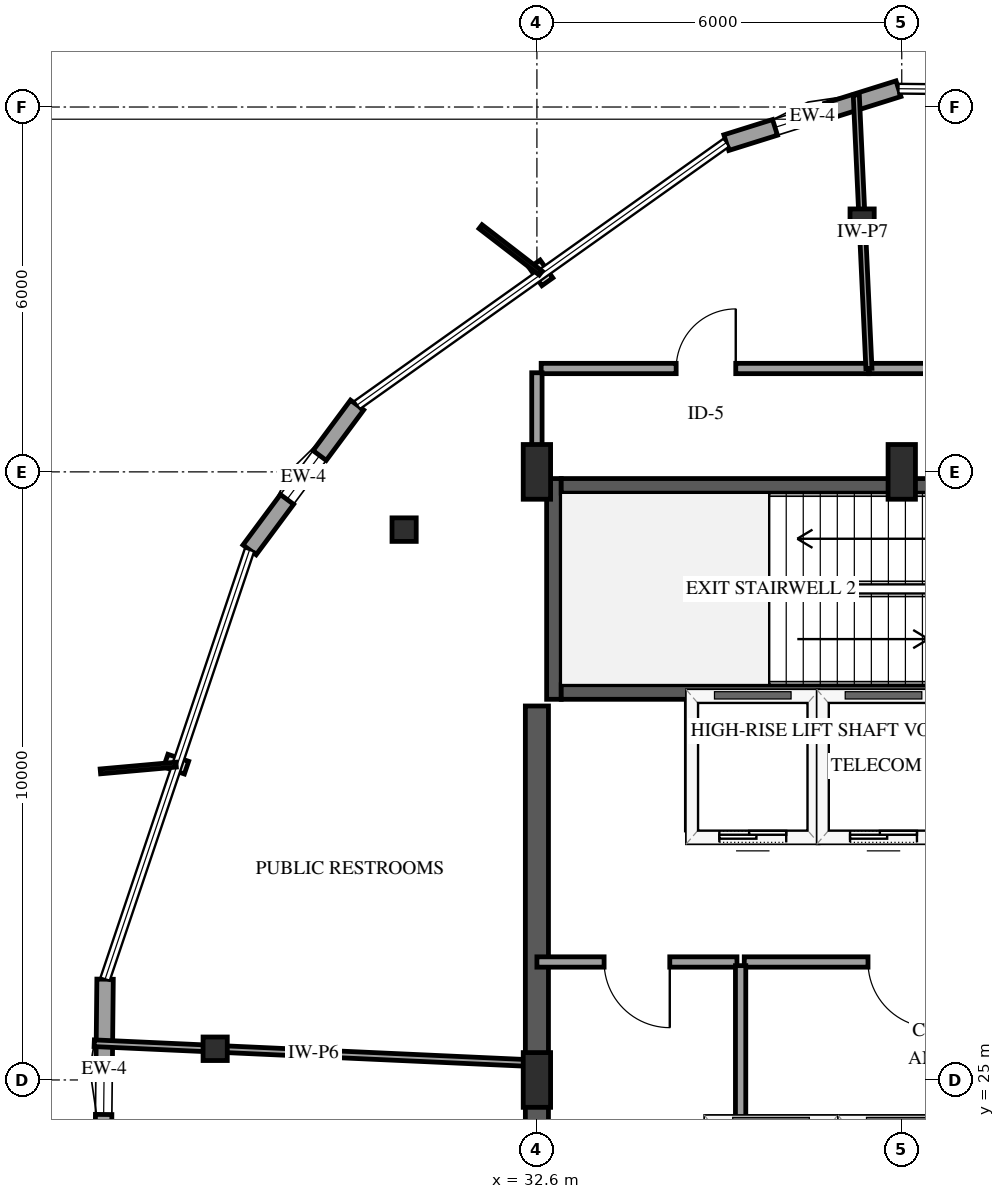
"""IFC4 building model, lengths in metres.
Left out: names, types, materials, properties, quantities, classifications, styles, units other than length and angle.
Written with IfcOpenShell. Run it as: python <this file> out.ifc"""

import sys

from ifc_helpers import new_model, si_unit, direction, frame, frame_2d, origin, origin_2d, place, context, subcontext, project, spatial, rectangle, i_section, extrude, element, fill, save


model = new_model("IFC4")
c1 = context("Model", 3, precision=1e-05, world=origin(), true_north=direction((0.0, 1.0)))
c2 = subcontext(c1, "Body", "Model", "MODEL_VIEW")
j1 = project(units=[si_unit("LENGTHUNIT", "METRE"), si_unit("PLANEANGLEUNIT", "RADIAN")], contexts=[c1])
p1 = place(None, origin())
s1 = spatial("IfcSite", under=j1, at=p1, CompositionType="ELEMENT")
p2 = place(p1, origin())
s2 = spatial("IfcBuilding", under=s1, at=p2, CompositionType="ELEMENT")
p3 = place(p2, frame((0.0, 0.0, 297.25)))
s3 = spatial("IfcBuildingStorey", under=s2, at=p3, CompositionType="ELEMENT", Elevation=297.25)
p4 = place(p3, frame((32.88, 31.26, 0.0), z_axis=(0.0, 0.0, 1.0), x_axis=(0.0, 1.0, 0.0)))
e1 = element("IfcWall", 1, at=p4, inside=s3, PredefinedType="SHEAR", context=c2, shape_type="SweptSolid", body=[
    extrude(rectangle(XDim=3.63, YDim=0.24, at=frame_2d((1.815, 0.0))), origin(), (0.0, 0.0, 1.0), 4.2),
])
for number, where, z_axis, x_axis in (
    (2, (33.0, 31.38, 0.0), (0.0, 0.0, 1.0), (1.0, 0.0, 0.0)),
    (3, (33.0, 34.77, 0.0), (0.0, 0.0, 1.0), (1.0, 0.0, 0.0)),
):
    element("IfcWall", number, at=place(p3, frame(where, z_axis=z_axis, x_axis=x_axis)), inside=s3, PredefinedType="SHEAR", context=c2, shape_type="SweptSolid", body=[
        extrude(rectangle(XDim=8.0, YDim=0.24, at=frame_2d((4.0, 0.0))), origin(), (0.0, 0.0, 1.0), 4.2),
    ])
p5 = place(p3, frame((32.6, 18.85, 0.0), z_axis=(0.0, 0.0, 1.0), x_axis=(0.0, 1.0, 0.0)))
e4 = element("IfcWall", 4, at=p5, inside=s3, PredefinedType="SHEAR", context=c2, shape_type="SweptSolid", body=[
    extrude(rectangle(XDim=12.3, YDim=0.38, at=frame_2d((6.15, 0.0))), origin(), (0.0, 0.0, 1.0), 4.2),
])
for number, where, z_axis, x_axis in (
    (5, (32.6, 25.0, 0.0), (0.0, 0.0, 1.0), (1.0, 0.0, 0.0)),
    (6, (32.6, 35.0, 0.0), (0.0, 0.0, 1.0), (1.0, 0.0, 0.0)),
    (7, (38.6, 35.0, 0.0), (0.0, 0.0, 1.0), (1.0, 0.0, 0.0)),
):
    element("IfcColumn", number, at=place(p3, frame(where, z_axis=z_axis, x_axis=x_axis)), inside=s3, PredefinedType="PILASTER", context=c2, shape_type="SweptSolid", body=[
        extrude(rectangle(XDim=0.45, YDim=0.9, at=origin_2d()), origin(), (0.0, 0.0, 1.0), 4.2),
    ])
for number, where, z_axis, x_axis in (
    (8, (37.948, 39.131, 0.0), (0.0, 0.0, 1.0), (1.0, 0.0, 0.0)),
    (9, (30.416, 34.05, 0.0), (0.0, 0.0, 1.0), (1.0, 0.0, 0.0)),
    (10, (27.309, 25.513, 0.0), (0.0, 0.0, 1.0), (1.0, 0.0, 0.0)),
):
    element("IfcColumn", number, at=place(p3, frame(where, z_axis=z_axis, x_axis=x_axis)), inside=s3, PredefinedType="COLUMN", context=c2, shape_type="SweptSolid", body=[
        extrude(i_section(OverallWidth=0.398, OverallDepth=0.387, WebThickness=0.021, FlangeThickness=0.033, FilletRadius=0.038, at=origin_2d()), origin(), (0.0, 0.0, 1.0), 4.2),
    ])
p6 = place(p3, frame((38.546, 41.301, 0.0), z_axis=(0.0, 0.0, 1.0), x_axis=(-0.954232173164, -0.299066814772, 0.0)))
e11 = element("IfcWall", 11, at=p6, inside=s3, PredefinedType="SOLIDWALL", context=c2, shape_type="SweptSolid", body=[
    extrude(rectangle(XDim=2.967, YDim=0.27, at=frame_2d((1.483, 0.0))), origin(), (0.0, 0.0, 1.0), 3.274),
])
p7 = place(p6, frame((1.228, 0.0, 0.75)))
e12 = element("IfcOpeningElement", 12, at=p7, cuts=e11, PredefinedType="OPENING", context=c2, shape_type="SweptSolid", body=[
    extrude(rectangle(XDim=0.9, YDim=1.5, at=frame_2d((0.45, 0.75))), frame((0.0, 0.145, 0.0), z_axis=(0.0, -1.0, 0.0), x_axis=(1.0, 0.0, 0.0)), (0.0, 0.0, 1.0), 0.29),
])
p8 = place(p3, frame((29.643, 36.099, 0.0), z_axis=(0.0, 0.0, 1.0), x_axis=(-0.596187618303, -0.80284514309, 0.0)))
e13 = element("IfcWall", 13, at=p8, inside=s3, PredefinedType="SOLIDWALL", context=c2, shape_type="SweptSolid", body=[
    extrude(rectangle(XDim=2.967, YDim=0.27, at=frame_2d((1.483, 0.0))), origin(), (0.0, 0.0, 1.0), 3.274),
])
p9 = place(p8, frame((1.033, 0.0, 0.75)))
e14 = element("IfcOpeningElement", 14, at=p9, cuts=e13, PredefinedType="OPENING", context=c2, shape_type="SweptSolid", body=[
    extrude(rectangle(XDim=0.9, YDim=1.5, at=frame_2d((0.45, 0.75))), frame((0.0, 0.145, 0.0), z_axis=(0.0, -1.0, 0.0), x_axis=(1.0, 0.0, 0.0)), (0.0, 0.0, 1.0), 0.29),
])
p10 = place(p3, frame((25.498, 26.657, 0.0), z_axis=(0.0, 0.0, 1.0), x_axis=(-0.010452103923, -0.99994537527, 0.0)))
e15 = element("IfcWall", 15, at=p10, inside=s3, PredefinedType="SOLIDWALL", context=c2, shape_type="SweptSolid", body=[
    extrude(rectangle(XDim=2.967, YDim=0.27, at=frame_2d((1.483, 0.0))), origin(), (0.0, 0.0, 1.0), 3.274),
])
p11 = place(p10, frame((1.325, 0.0, 0.75)))
e16 = element("IfcOpeningElement", 16, at=p11, cuts=e15, PredefinedType="OPENING", context=c2, shape_type="SweptSolid", body=[
    extrude(rectangle(XDim=0.9, YDim=1.5, at=frame_2d((0.45, 0.75))), frame((0.0, 0.145, 0.0), z_axis=(0.0, -1.0, 0.0), x_axis=(1.0, 0.0, 0.0)), (0.0, 0.0, 1.0), 0.29),
])
for number, where, z_axis, x_axis in (
    (17, (35.45, 24.3, 0.0), (0.0, 0.0, 1.0), (1.0, 0.0, 0.0)),
    (18, (37.65, 24.3, 0.0), (0.0, 0.0, 1.0), (1.0, 0.0, 0.0)),
):
    element("IfcWall", number, at=place(p3, frame(where, z_axis=z_axis, x_axis=x_axis)), inside=s3, PredefinedType="SOLIDWALL", context=c2, shape_type="SweptSolid", body=[
        extrude(rectangle(XDim=2.0, YDim=0.185, at=frame_2d((1.0, 0.0))), origin(), (0.0, 0.0, 1.0), 3.895),
    ])
p12 = place(p3, frame((35.15, 29.0, 0.0), z_axis=(0.0, 0.0, 1.0), x_axis=(1.0, 0.0, 0.0)))
e19 = element("IfcWall", 19, at=p12, inside=s3, PredefinedType="SOLIDWALL", context=c2, shape_type="SweptSolid", body=[
    extrude(rectangle(XDim=2.0, YDim=0.185, at=frame_2d((1.0, 0.0))), origin(), (0.0, 0.0, 1.0), 3.895),
])
p13 = place(p12, frame((0.45, 0.0, 0.0)))
e20 = element("IfcOpeningElement", 20, at=p13, cuts=e19, PredefinedType="OPENING", context=c2, shape_type="SweptSolid", body=[
    extrude(rectangle(XDim=1.1, YDim=2.15, at=frame_2d((0.55, 1.075))), frame((0.0, 0.103, 0.0), z_axis=(0.0, -1.0, 0.0), x_axis=(1.0, 0.0, 0.0)), (0.0, 0.0, 1.0), 0.205),
])
for number, where, z_axis, x_axis in (
    (21, (35.15, 29.11, 0.0), (0.0, 0.0, 1.0), (0.0, 1.0, 0.0)),
    (22, (37.15, 29.11, 0.0), (0.0, 0.0, 1.0), (0.0, 1.0, 0.0)),
):
    element("IfcWall", number, at=place(p3, frame(where, z_axis=z_axis, x_axis=x_axis)), inside=s3, PredefinedType="SOLIDWALL", context=c2, shape_type="SweptSolid", body=[
        extrude(rectangle(XDim=2.1, YDim=0.185, at=frame_2d((1.05, 0.0))), origin(), (0.0, 0.0, 1.0), 3.895),
    ])
p14 = place(p3, frame((37.3, 29.0, 0.0), z_axis=(0.0, 0.0, 1.0), x_axis=(1.0, 0.0, 0.0)))
e23 = element("IfcWall", 23, at=p14, inside=s3, PredefinedType="SOLIDWALL", context=c2, shape_type="SweptSolid", body=[
    extrude(rectangle(XDim=2.0, YDim=0.185, at=frame_2d((1.0, 0.0))), origin(), (0.0, 0.0, 1.0), 3.895),
])
p15 = place(p14, frame((0.45, 0.0, 0.0)))
e24 = element("IfcOpeningElement", 24, at=p15, cuts=e23, PredefinedType="OPENING", context=c2, shape_type="SweptSolid", body=[
    extrude(rectangle(XDim=1.1, YDim=2.15, at=frame_2d((0.55, 1.075))), frame((0.0, 0.103, 0.0), z_axis=(0.0, -1.0, 0.0), x_axis=(1.0, 0.0, 0.0)), (0.0, 0.0, 1.0), 0.205),
])
p16 = place(p3, frame((38.06, 36.7, 0.0), z_axis=(0.0, 0.0, 1.0), x_axis=(1.0, 0.0, 0.0)))
e25 = element("IfcWall", 25, at=p16, inside=s3, PredefinedType="PARTITIONING", context=c2, shape_type="SweptSolid", body=[
    extrude(rectangle(XDim=8.12, YDim=0.17, at=frame_2d((4.06, 0.0))), origin(), (0.0, 0.0, 1.0), 3.895),
])
p17 = place(p16, frame((3.585, 0.0, 0.0)))
e26 = element("IfcOpeningElement", 26, at=p17, cuts=e25, PredefinedType="OPENING", context=c2, shape_type="SweptSolid", body=[
    extrude(rectangle(XDim=0.98, YDim=2.15, at=frame_2d((0.49, 1.075))), frame((0.0, 0.095, 0.0), z_axis=(0.0, -1.0, 0.0), x_axis=(1.0, 0.0, 0.0)), (0.0, 0.0, 1.0), 0.19),
])
p18 = place(p3, frame((32.527, 25.276, 0.0), z_axis=(0.0, 0.0, 1.0), x_axis=(-0.998965188352, 0.045481341909, 0.0)))
e27 = element("IfcWall", 27, at=p18, inside=s3, PredefinedType="PARTITIONING", context=c2, shape_type="SweptSolid", body=[
    extrude(rectangle(XDim=7.215, YDim=0.11, at=frame_2d((3.607, 0.0))), origin(), (0.0, 0.0, 1.0), 3.19),
])
p19 = place(p3, frame((32.67, 36.7, 0.0), z_axis=(0.0, 0.0, 1.0), x_axis=(1.0, 0.0, 0.0)))
e28 = element("IfcWall", 28, at=p19, inside=s3, PredefinedType="PARTITIONING", context=c2, shape_type="SweptSolid", body=[
    extrude(rectangle(XDim=5.39, YDim=0.17, at=frame_2d((2.695, 0.0))), origin(), (0.0, 0.0, 1.0), 3.895),
])
p20 = place(p19, frame((2.22, 0.0, 0.0)))
e29 = element("IfcOpeningElement", 29, at=p20, cuts=e28, PredefinedType="OPENING", context=c2, shape_type="SweptSolid", body=[
    extrude(rectangle(XDim=0.98, YDim=2.15, at=frame_2d((0.49, 1.075))), frame((0.0, 0.095, 0.0), z_axis=(0.0, -1.0, 0.0), x_axis=(1.0, 0.0, 0.0)), (0.0, 0.0, 1.0), 0.19),
])
p21 = place(p3, frame((41.16, 26.94, 0.0), z_axis=(0.0, 0.0, 1.0), x_axis=(-1.0, 0.0, 0.0)))
e30 = element("IfcWall", 30, at=p21, inside=s3, PredefinedType="PARTITIONING", context=c2, shape_type="SweptSolid", body=[
    extrude(rectangle(XDim=5.15, YDim=0.17, at=frame_2d((2.575, 0.0))), origin(), (0.0, 0.0, 1.0), 3.895),
])
p22 = place(p21, frame((2.035, 0.0, 0.0)))
e31 = element("IfcOpeningElement", 31, at=p22, cuts=e30, PredefinedType="OPENING", context=c2, shape_type="SweptSolid", body=[
    extrude(rectangle(XDim=1.08, YDim=2.15, at=frame_2d((0.54, 1.075))), frame((0.0, 0.095, 0.0), z_axis=(0.0, -1.0, 0.0), x_axis=(1.0, 0.0, 0.0)), (0.0, 0.0, 1.0), 0.19),
])
p23 = place(p3, frame((38.06, 36.7, 0.0), z_axis=(0.0, 0.0, 1.0), x_axis=(-0.046184656357, 0.998932919428, 0.0)))
e32 = element("IfcWall", 32, at=p23, inside=s3, PredefinedType="PARTITIONING", context=c2, shape_type="SweptSolid", body=[
    extrude(rectangle(XDim=4.504, YDim=0.1, at=frame_2d((2.252, 0.0))), origin(), (0.0, 0.0, 1.0), 3.19),
])
p24 = place(p3, frame((35.89, 26.94, 0.0), z_axis=(0.0, 0.0, 1.0), x_axis=(-1.0, 0.0, 0.0)))
e33 = element("IfcWall", 33, at=p24, inside=s3, PredefinedType="PARTITIONING", context=c2, shape_type="SweptSolid", body=[
    extrude(rectangle(XDim=3.29, YDim=0.17, at=frame_2d((1.645, 0.0))), origin(), (0.0, 0.0, 1.0), 3.895),
])
p25 = place(p24, frame((1.105, 0.0, 0.0)))
e34 = element("IfcOpeningElement", 34, at=p25, cuts=e33, PredefinedType="OPENING", context=c2, shape_type="SweptSolid", body=[
    extrude(rectangle(XDim=1.08, YDim=2.15, at=frame_2d((0.54, 1.075))), frame((0.0, 0.095, 0.0), z_axis=(0.0, -1.0, 0.0), x_axis=(1.0, 0.0, 0.0)), (0.0, 0.0, 1.0), 0.19),
])
p26 = place(p3, frame((35.95, 26.88, 0.0), z_axis=(0.0, 0.0, 1.0), x_axis=(0.0, -1.0, 0.0)))
e35 = element("IfcWall", 35, at=p26, inside=s3, PredefinedType="PARTITIONING", context=c2, shape_type="SweptSolid", body=[
    extrude(rectangle(XDim=2.58, YDim=0.17, at=frame_2d((1.29, 0.0))), origin(), (0.0, 0.0, 1.0), 3.895),
])
p27 = place(p3, frame((32.6, 35.12, 0.0), z_axis=(0.0, 0.0, 1.0), x_axis=(0.0, 1.0, 0.0)))
e36 = element("IfcWall", 36, at=p27, inside=s3, PredefinedType="PARTITIONING", context=c2, shape_type="SweptSolid", body=[
    extrude(rectangle(XDim=1.51, YDim=0.17, at=frame_2d((0.755, 0.0))), origin(), (0.0, 0.0, 1.0), 3.895),
])
p28 = place(p7, origin())
e37 = element("IfcWindow", 37, at=p28, inside=s3, PartitioningType="SINGLE_PANEL", PredefinedType="WINDOW", context=c2, shape_type="SweptSolid", body=[
    extrude(rectangle(XDim=0.9, YDim=1.5, at=frame_2d((0.45, 0.75))), frame((0.0, 0.03, 0.0), z_axis=(0.0, -1.0, 0.0), x_axis=(1.0, 0.0, 0.0)), (0.0, 0.0, 1.0), 0.06),
])
fill(e12, e37)
p29 = place(p9, origin())
e38 = element("IfcWindow", 38, at=p29, inside=s3, PartitioningType="SINGLE_PANEL", PredefinedType="WINDOW", context=c2, shape_type="SweptSolid", body=[
    extrude(rectangle(XDim=0.9, YDim=1.5, at=frame_2d((0.45, 0.75))), frame((0.0, 0.03, 0.0), z_axis=(0.0, -1.0, 0.0), x_axis=(1.0, 0.0, 0.0)), (0.0, 0.0, 1.0), 0.06),
])
fill(e14, e38)
p30 = place(p11, origin())
e39 = element("IfcWindow", 39, at=p30, inside=s3, PartitioningType="SINGLE_PANEL", PredefinedType="WINDOW", context=c2, shape_type="SweptSolid", body=[
    extrude(rectangle(XDim=0.9, YDim=1.5, at=frame_2d((0.45, 0.75))), frame((0.0, 0.03, 0.0), z_axis=(0.0, -1.0, 0.0), x_axis=(1.0, 0.0, 0.0)), (0.0, 0.0, 1.0), 0.06),
])
fill(e16, e39)
p31 = place(p13, origin())
e40 = element("IfcDoor", 40, at=p31, inside=s3, OperationType="SLIDING_TO_LEFT", PredefinedType="DOOR", context=c2, shape_type="SweptSolid", body=[
    extrude(rectangle(XDim=1.1, YDim=2.15, at=frame_2d((0.55, 1.075))), frame((0.0, 0.025, 0.0), z_axis=(0.0, -1.0, 0.0), x_axis=(1.0, 0.0, 0.0)), (0.0, 0.0, 1.0), 0.05),
])
fill(e20, e40)
p32 = place(p15, origin())
e41 = element("IfcDoor", 41, at=p32, inside=s3, OperationType="SLIDING_TO_LEFT", PredefinedType="DOOR", context=c2, shape_type="SweptSolid", body=[
    extrude(rectangle(XDim=1.1, YDim=2.15, at=frame_2d((0.55, 1.075))), frame((0.0, 0.025, 0.0), z_axis=(0.0, -1.0, 0.0), x_axis=(1.0, 0.0, 0.0)), (0.0, 0.0, 1.0), 0.05),
])
fill(e24, e41)
p33 = place(p20, origin())
e42 = element("IfcDoor", 42, at=p33, inside=s3, OperationType="SINGLE_SWING_RIGHT", PredefinedType="DOOR", context=c2, shape_type="SweptSolid", body=[
    extrude(rectangle(XDim=0.98, YDim=2.15, at=frame_2d((0.49, 1.075))), frame((0.0, 0.025, 0.0), z_axis=(0.0, -1.0, 0.0), x_axis=(1.0, 0.0, 0.0)), (0.0, 0.0, 1.0), 0.05),
])
fill(e29, e42)
p34 = place(p22, origin())
e43 = element("IfcDoor", 43, at=p34, inside=s3, OperationType="SINGLE_SWING_LEFT", PredefinedType="DOOR", context=c2, shape_type="SweptSolid", body=[
    extrude(rectangle(XDim=1.08, YDim=2.15, at=frame_2d((0.54, 1.075))), frame((0.0, 0.025, 0.0), z_axis=(0.0, -1.0, 0.0), x_axis=(1.0, 0.0, 0.0)), (0.0, 0.0, 1.0), 0.05),
])
fill(e31, e43)
p35 = place(p25, origin())
e44 = element("IfcDoor", 44, at=p35, inside=s3, OperationType="SINGLE_SWING_LEFT", PredefinedType="DOOR", context=c2, shape_type="SweptSolid", body=[
    extrude(rectangle(XDim=1.08, YDim=2.15, at=frame_2d((0.54, 1.075))), frame((0.0, 0.025, 0.0), z_axis=(0.0, -1.0, 0.0), x_axis=(1.0, 0.0, 0.0)), (0.0, 0.0, 1.0), 0.05),
])
fill(e34, e44)
save(model, sys.argv[1])
